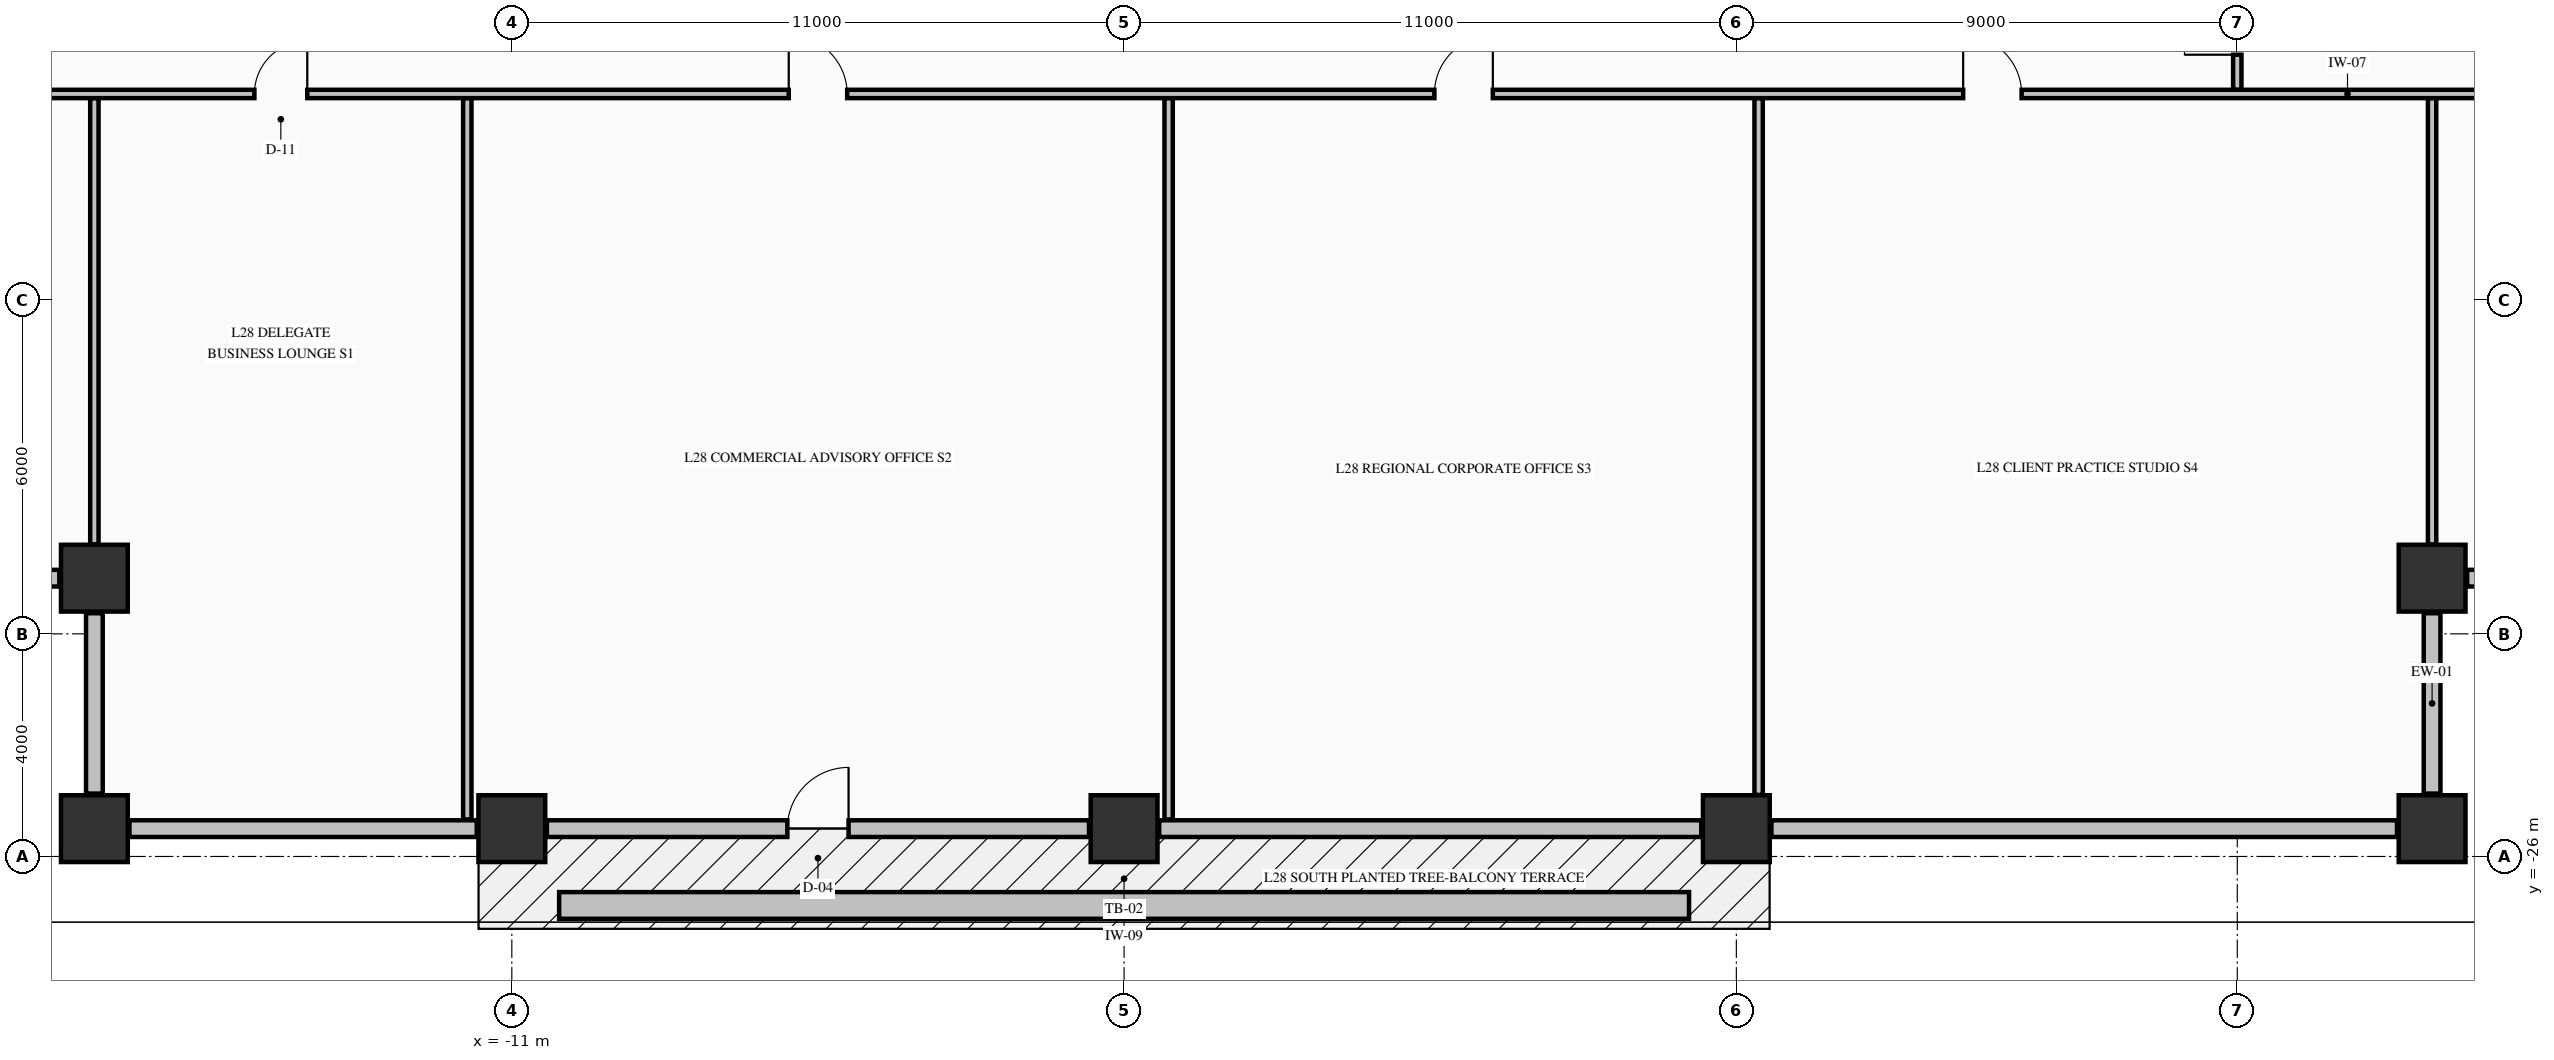
"""IFC4 building model, lengths in metres.
Left out: names, types, materials, properties, quantities, classifications, styles, units other than length and angle.
Written with IfcOpenShell. Run it as: python <this file> out.ifc"""

import sys

from ifc_helpers import new_model, si_unit, direction, frame, frame_2d, origin, origin_2d, place, context, subcontext, project, spatial, rectangle, extrude, element, fill, save


model = new_model("IFC4")
c1 = context("Model", 3, precision=1e-05, world=origin(), true_north=direction((0.0, 1.0)))
c2 = subcontext(c1, "Body", "Model", "MODEL_VIEW")
j1 = project(units=[si_unit("LENGTHUNIT", "METRE"), si_unit("PLANEANGLEUNIT", "RADIAN")], contexts=[c1])
p1 = place(None, origin())
s1 = spatial("IfcSite", under=j1, at=p1, CompositionType="ELEMENT")
p2 = place(p1, origin())
s2 = spatial("IfcBuilding", under=s1, at=p2, CompositionType="ELEMENT")
p3 = place(p2, frame((0.0, 0.0, 112.78)))
s3 = spatial("IfcBuildingStorey", under=s2, at=p3, CompositionType="ELEMENT", Elevation=112.78)
for number, where, z_axis, x_axis in (
    (1, (-18.5, -25.5, -0.25), (0.0, 0.0, 1.0), (1.0, 0.0, 0.0)),
    (2, (-11.0, -25.5, -0.25), (0.0, 0.0, 1.0), (1.0, 0.0, 0.0)),
    (3, (0.0, -25.5, -0.25), (0.0, 0.0, 1.0), (1.0, 0.0, 0.0)),
    (4, (11.0, -25.5, -0.25), (0.0, 0.0, 1.0), (1.0, 0.0, 0.0)),
    (5, (23.5, -25.5, -0.25), (0.0, 0.0, 1.0), (1.0, 0.0, 0.0)),
    (6, (-18.5, -21.0, -0.25), (0.0, 0.0, 1.0), (1.0, 0.0, 0.0)),
    (7, (23.5, -21.0, -0.25), (0.0, 0.0, 1.0), (1.0, 0.0, 0.0)),
):
    element("IfcColumn", number, at=place(p3, frame(where, z_axis=z_axis, x_axis=x_axis)), inside=s3, PredefinedType="COLUMN", context=c2, shape_type="SweptSolid", body=[
        extrude(rectangle(XDim=1.2, YDim=1.2, at=origin_2d()), origin(), (0.0, 0.0, 1.0), 3.395),
    ])
for number, where, z_axis, x_axis in (
    (8, (23.5, -24.87, 0.0), (0.0, 0.0, 1.0), (0.0, 1.0, 0.0)),
    (9, (24.13, -21.0, 0.0), (0.0, 0.0, 1.0), (1.0, 0.0, 0.0)),
    (10, (-22.37, -21.0, 0.0), (0.0, 0.0, 1.0), (1.0, 0.0, 0.0)),
    (11, (-18.5, -21.63, 0.0), (0.0, 0.0, 1.0), (0.0, -1.0, 0.0)),
):
    element("IfcWall", number, at=place(p3, frame(where, z_axis=z_axis, x_axis=x_axis)), inside=s3, PredefinedType="STANDARD", context=c2, shape_type="SweptSolid", body=[
        extrude(rectangle(XDim=3.24, YDim=0.3, at=frame_2d((1.62, 0.0))), origin(), (0.0, 0.0, 1.0), 2.537),
    ])
p4 = place(p3, frame((-17.87, -25.5, 0.0), z_axis=(0.0, 0.0, 1.0), x_axis=(1.0, 0.0, 0.0)))
e12 = element("IfcWall", 12, at=p4, inside=s3, PredefinedType="STANDARD", context=c2, shape_type="SweptSolid", body=[
    extrude(rectangle(XDim=6.24, YDim=0.3, at=frame_2d((3.12, 0.0))), origin(), (0.0, 0.0, 1.0), 2.537),
])
p5 = place(p3, frame((-10.37, -25.5, 0.0), z_axis=(0.0, 0.0, 1.0), x_axis=(1.0, 0.0, 0.0)))
e13 = element("IfcWall", 13, at=p5, inside=s3, PredefinedType="STANDARD", context=c2, shape_type="SweptSolid", body=[
    extrude(rectangle(XDim=9.74, YDim=0.3, at=frame_2d((4.87, 0.0))), origin(), (0.0, 0.0, 1.0), 2.537),
])
p6 = place(p5, frame((4.32, 0.0, 0.0)))
e14 = element("IfcOpeningElement", 14, at=p6, cuts=e13, PredefinedType="OPENING", context=c2, shape_type="SweptSolid", body=[
    extrude(rectangle(XDim=1.1, YDim=2.15, at=frame_2d((0.55, 1.075))), frame((0.0, 0.16, 0.0), z_axis=(0.0, -1.0, 0.0), x_axis=(1.0, 0.0, 0.0)), (0.0, 0.0, 1.0), 0.32),
])
p7 = place(p3, frame((0.63, -25.5, 0.0), z_axis=(0.0, 0.0, 1.0), x_axis=(1.0, 0.0, 0.0)))
e15 = element("IfcWall", 15, at=p7, inside=s3, PredefinedType="STANDARD", context=c2, shape_type="SweptSolid", body=[
    extrude(rectangle(XDim=9.74, YDim=0.3, at=frame_2d((4.87, 0.0))), origin(), (0.0, 0.0, 1.0), 2.537),
])
p8 = place(p3, frame((11.63, -25.5, 0.0), z_axis=(0.0, 0.0, 1.0), x_axis=(1.0, 0.0, 0.0)))
e16 = element("IfcWall", 16, at=p8, inside=s3, PredefinedType="STANDARD", context=c2, shape_type="SweptSolid", body=[
    extrude(rectangle(XDim=11.24, YDim=0.3, at=frame_2d((5.62, 0.0))), origin(), (0.0, 0.0, 1.0), 2.537),
])
p9 = place(p3, frame((-22.835, -12.3, 0.0), z_axis=(0.0, 0.0, 1.0), x_axis=(1.0, 0.0, 0.0)))
e17 = element("IfcWall", 17, at=p9, inside=s3, PredefinedType="PARTITIONING", context=c2, shape_type="SweptSolid", body=[
    extrude(rectangle(XDim=50.67, YDim=0.15, at=frame_2d((25.335, 0.0))), origin(), (0.0, 0.0, 1.0), 3.145),
])
p10 = place(p9, frame((7.21, 0.0, 0.0)))
e18 = element("IfcOpeningElement", 18, at=p10, cuts=e17, PredefinedType="OPENING", context=c2, shape_type="SweptSolid", body=[
    extrude(rectangle(XDim=0.95, YDim=2.15, at=frame_2d((0.475, 1.075))), frame((0.0, 0.085, 0.0), z_axis=(0.0, -1.0, 0.0), x_axis=(1.0, 0.0, 0.0)), (0.0, 0.0, 1.0), 0.17),
])
p11 = place(p9, frame((16.81, 0.0, 0.0)))
e19 = element("IfcOpeningElement", 19, at=p11, cuts=e17, PredefinedType="OPENING", context=c2, shape_type="SweptSolid", body=[
    extrude(rectangle(XDim=1.05, YDim=2.15, at=frame_2d((0.525, 1.075))), frame((0.0, 0.085, 0.0), z_axis=(0.0, -1.0, 0.0), x_axis=(1.0, 0.0, 0.0)), (0.0, 0.0, 1.0), 0.17),
])
p12 = place(p9, frame((28.41, 0.0, 0.0)))
e20 = element("IfcOpeningElement", 20, at=p12, cuts=e17, PredefinedType="OPENING", context=c2, shape_type="SweptSolid", body=[
    extrude(rectangle(XDim=1.05, YDim=2.15, at=frame_2d((0.525, 1.075))), frame((0.0, 0.085, 0.0), z_axis=(0.0, -1.0, 0.0), x_axis=(1.0, 0.0, 0.0)), (0.0, 0.0, 1.0), 0.17),
])
p13 = place(p9, frame((37.91, 0.0, 0.0)))
e21 = element("IfcOpeningElement", 21, at=p13, cuts=e17, PredefinedType="OPENING", context=c2, shape_type="SweptSolid", body=[
    extrude(rectangle(XDim=1.05, YDim=2.15, at=frame_2d((0.525, 1.075))), frame((0.0, 0.085, 0.0), z_axis=(0.0, -1.0, 0.0), x_axis=(1.0, 0.0, 0.0)), (0.0, 0.0, 1.0), 0.17),
])
p14 = place(p3, frame((-18.5, -20.394, 0.0), z_axis=(0.0, 0.0, 1.0), x_axis=(0.0, 1.0, 0.0)))
e22 = element("IfcWall", 22, at=p14, inside=s3, PredefinedType="PARTITIONING", context=c2, shape_type="SweptSolid", body=[
    extrude(rectangle(XDim=8.016, YDim=0.15, at=frame_2d((4.008, 0.0))), origin(), (0.0, 0.0, 1.0), 3.145),
])
for number, where, z_axis, x_axis in (
    (23, (-11.8, -25.335, 0.0), (0.0, 0.0, 1.0), (0.0, 1.0, 0.0)),
    (24, (0.8, -25.335, 0.0), (0.0, 0.0, 1.0), (0.0, 1.0, 0.0)),
):
    element("IfcWall", number, at=place(p3, frame(where, z_axis=z_axis, x_axis=x_axis)), inside=s3, PredefinedType="PARTITIONING", context=c2, shape_type="SweptSolid", body=[
        extrude(rectangle(XDim=12.957, YDim=0.15, at=frame_2d((6.479, 0.0))), origin(), (0.0, 0.0, 1.0), 3.145),
    ])
p15 = place(p3, frame((11.4, -24.894, 0.0), z_axis=(0.0, 0.0, 1.0), x_axis=(0.0, 1.0, 0.0)))
e25 = element("IfcWall", 25, at=p15, inside=s3, PredefinedType="PARTITIONING", context=c2, shape_type="SweptSolid", body=[
    extrude(rectangle(XDim=12.516, YDim=0.15, at=frame_2d((6.258, 0.0))), origin(), (0.0, 0.0, 1.0), 3.145),
])
p16 = place(p3, frame((20.0, -12.222, 0.0), z_axis=(0.0, 0.0, 1.0), x_axis=(0.0, 1.0, 0.0)))
e26 = element("IfcWall", 26, at=p16, inside=s3, PredefinedType="PARTITIONING", context=c2, shape_type="SweptSolid", body=[
    extrude(rectangle(XDim=1.766, YDim=0.15, at=frame_2d((0.883, 0.0))), origin(), (0.0, 0.0, 1.0), 2.635),
])
p17 = place(p16, frame((0.627, 0.0, 0.0)))
e27 = element("IfcOpeningElement", 27, at=p17, cuts=e26, PredefinedType="OPENING", context=c2, shape_type="SweptSolid", body=[
    extrude(rectangle(XDim=0.95, YDim=2.15, at=frame_2d((0.475, 1.075))), frame((0.0, 0.085, 0.0), z_axis=(0.0, -1.0, 0.0), x_axis=(1.0, 0.0, 0.0)), (0.0, 0.0, 1.0), 0.17),
])
p18 = place(p3, frame((23.5, -20.394, 0.0), z_axis=(0.0, 0.0, 1.0), x_axis=(0.0, 1.0, 0.0)))
e28 = element("IfcWall", 28, at=p18, inside=s3, PredefinedType="PARTITIONING", context=c2, shape_type="SweptSolid", body=[
    extrude(rectangle(XDim=8.016, YDim=0.15, at=frame_2d((4.008, 0.0))), origin(), (0.0, 0.0, 1.0), 3.145),
])
p19 = place(p3, frame((-10.15, -26.88, -0.04), z_axis=(0.0, 0.0, 1.0), x_axis=(1.0, 0.0, 0.0)))
e29 = element("IfcWall", 29, at=p19, inside=s3, PredefinedType="PARAPET", context=c2, shape_type="SweptSolid", body=[
    extrude(rectangle(XDim=20.3, YDim=0.48, at=frame_2d((10.15, 0.0))), origin(), (0.0, 0.0, 1.0), 0.52),
])
p20 = place(p6, origin())
e30 = element("IfcDoor", 30, at=p20, inside=s3, OperationType="SINGLE_SWING_RIGHT", PredefinedType="DOOR", context=c2, shape_type="SweptSolid", body=[
    extrude(rectangle(XDim=1.1, YDim=2.15, at=frame_2d((0.55, 1.075))), frame((0.0, 0.025, 0.0), z_axis=(0.0, -1.0, 0.0), x_axis=(1.0, 0.0, 0.0)), (0.0, 0.0, 1.0), 0.05),
])
fill(e14, e30)
p21 = place(p10, origin())
e31 = element("IfcDoor", 31, at=p21, inside=s3, OperationType="SINGLE_SWING_RIGHT", PredefinedType="DOOR", context=c2, shape_type="SweptSolid", body=[
    extrude(rectangle(XDim=0.95, YDim=2.15, at=frame_2d((0.475, 1.075))), frame((0.0, 0.025, 0.0), z_axis=(0.0, -1.0, 0.0), x_axis=(1.0, 0.0, 0.0)), (0.0, 0.0, 1.0), 0.05),
])
fill(e18, e31)
p22 = place(p11, origin())
e32 = element("IfcDoor", 32, at=p22, inside=s3, OperationType="SINGLE_SWING_LEFT", PredefinedType="DOOR", context=c2, shape_type="SweptSolid", body=[
    extrude(rectangle(XDim=1.05, YDim=2.15, at=frame_2d((0.525, 1.075))), frame((0.0, 0.025, 0.0), z_axis=(0.0, -1.0, 0.0), x_axis=(1.0, 0.0, 0.0)), (0.0, 0.0, 1.0), 0.05),
])
fill(e19, e32)
p23 = place(p12, origin())
e33 = element("IfcDoor", 33, at=p23, inside=s3, OperationType="SINGLE_SWING_RIGHT", PredefinedType="DOOR", context=c2, shape_type="SweptSolid", body=[
    extrude(rectangle(XDim=1.05, YDim=2.15, at=frame_2d((0.525, 1.075))), frame((0.0, 0.025, 0.0), z_axis=(0.0, -1.0, 0.0), x_axis=(1.0, 0.0, 0.0)), (0.0, 0.0, 1.0), 0.05),
])
fill(e20, e33)
p24 = place(p13, origin())
e34 = element("IfcDoor", 34, at=p24, inside=s3, OperationType="SINGLE_SWING_LEFT", PredefinedType="DOOR", context=c2, shape_type="SweptSolid", body=[
    extrude(rectangle(XDim=1.05, YDim=2.15, at=frame_2d((0.525, 1.075))), frame((0.0, 0.025, 0.0), z_axis=(0.0, -1.0, 0.0), x_axis=(1.0, 0.0, 0.0)), (0.0, 0.0, 1.0), 0.05),
])
fill(e21, e34)
p25 = place(p17, origin())
e35 = element("IfcDoor", 35, at=p25, inside=s3, OperationType="SINGLE_SWING_LEFT", PredefinedType="DOOR", context=c2, shape_type="SweptSolid", body=[
    extrude(rectangle(XDim=0.95, YDim=2.15, at=frame_2d((0.475, 1.075))), frame((0.0, 0.025, 0.0), z_axis=(0.0, -1.0, 0.0), x_axis=(1.0, 0.0, 0.0)), (0.0, 0.0, 1.0), 0.05),
])
fill(e27, e35)
save(model, sys.argv[1])
